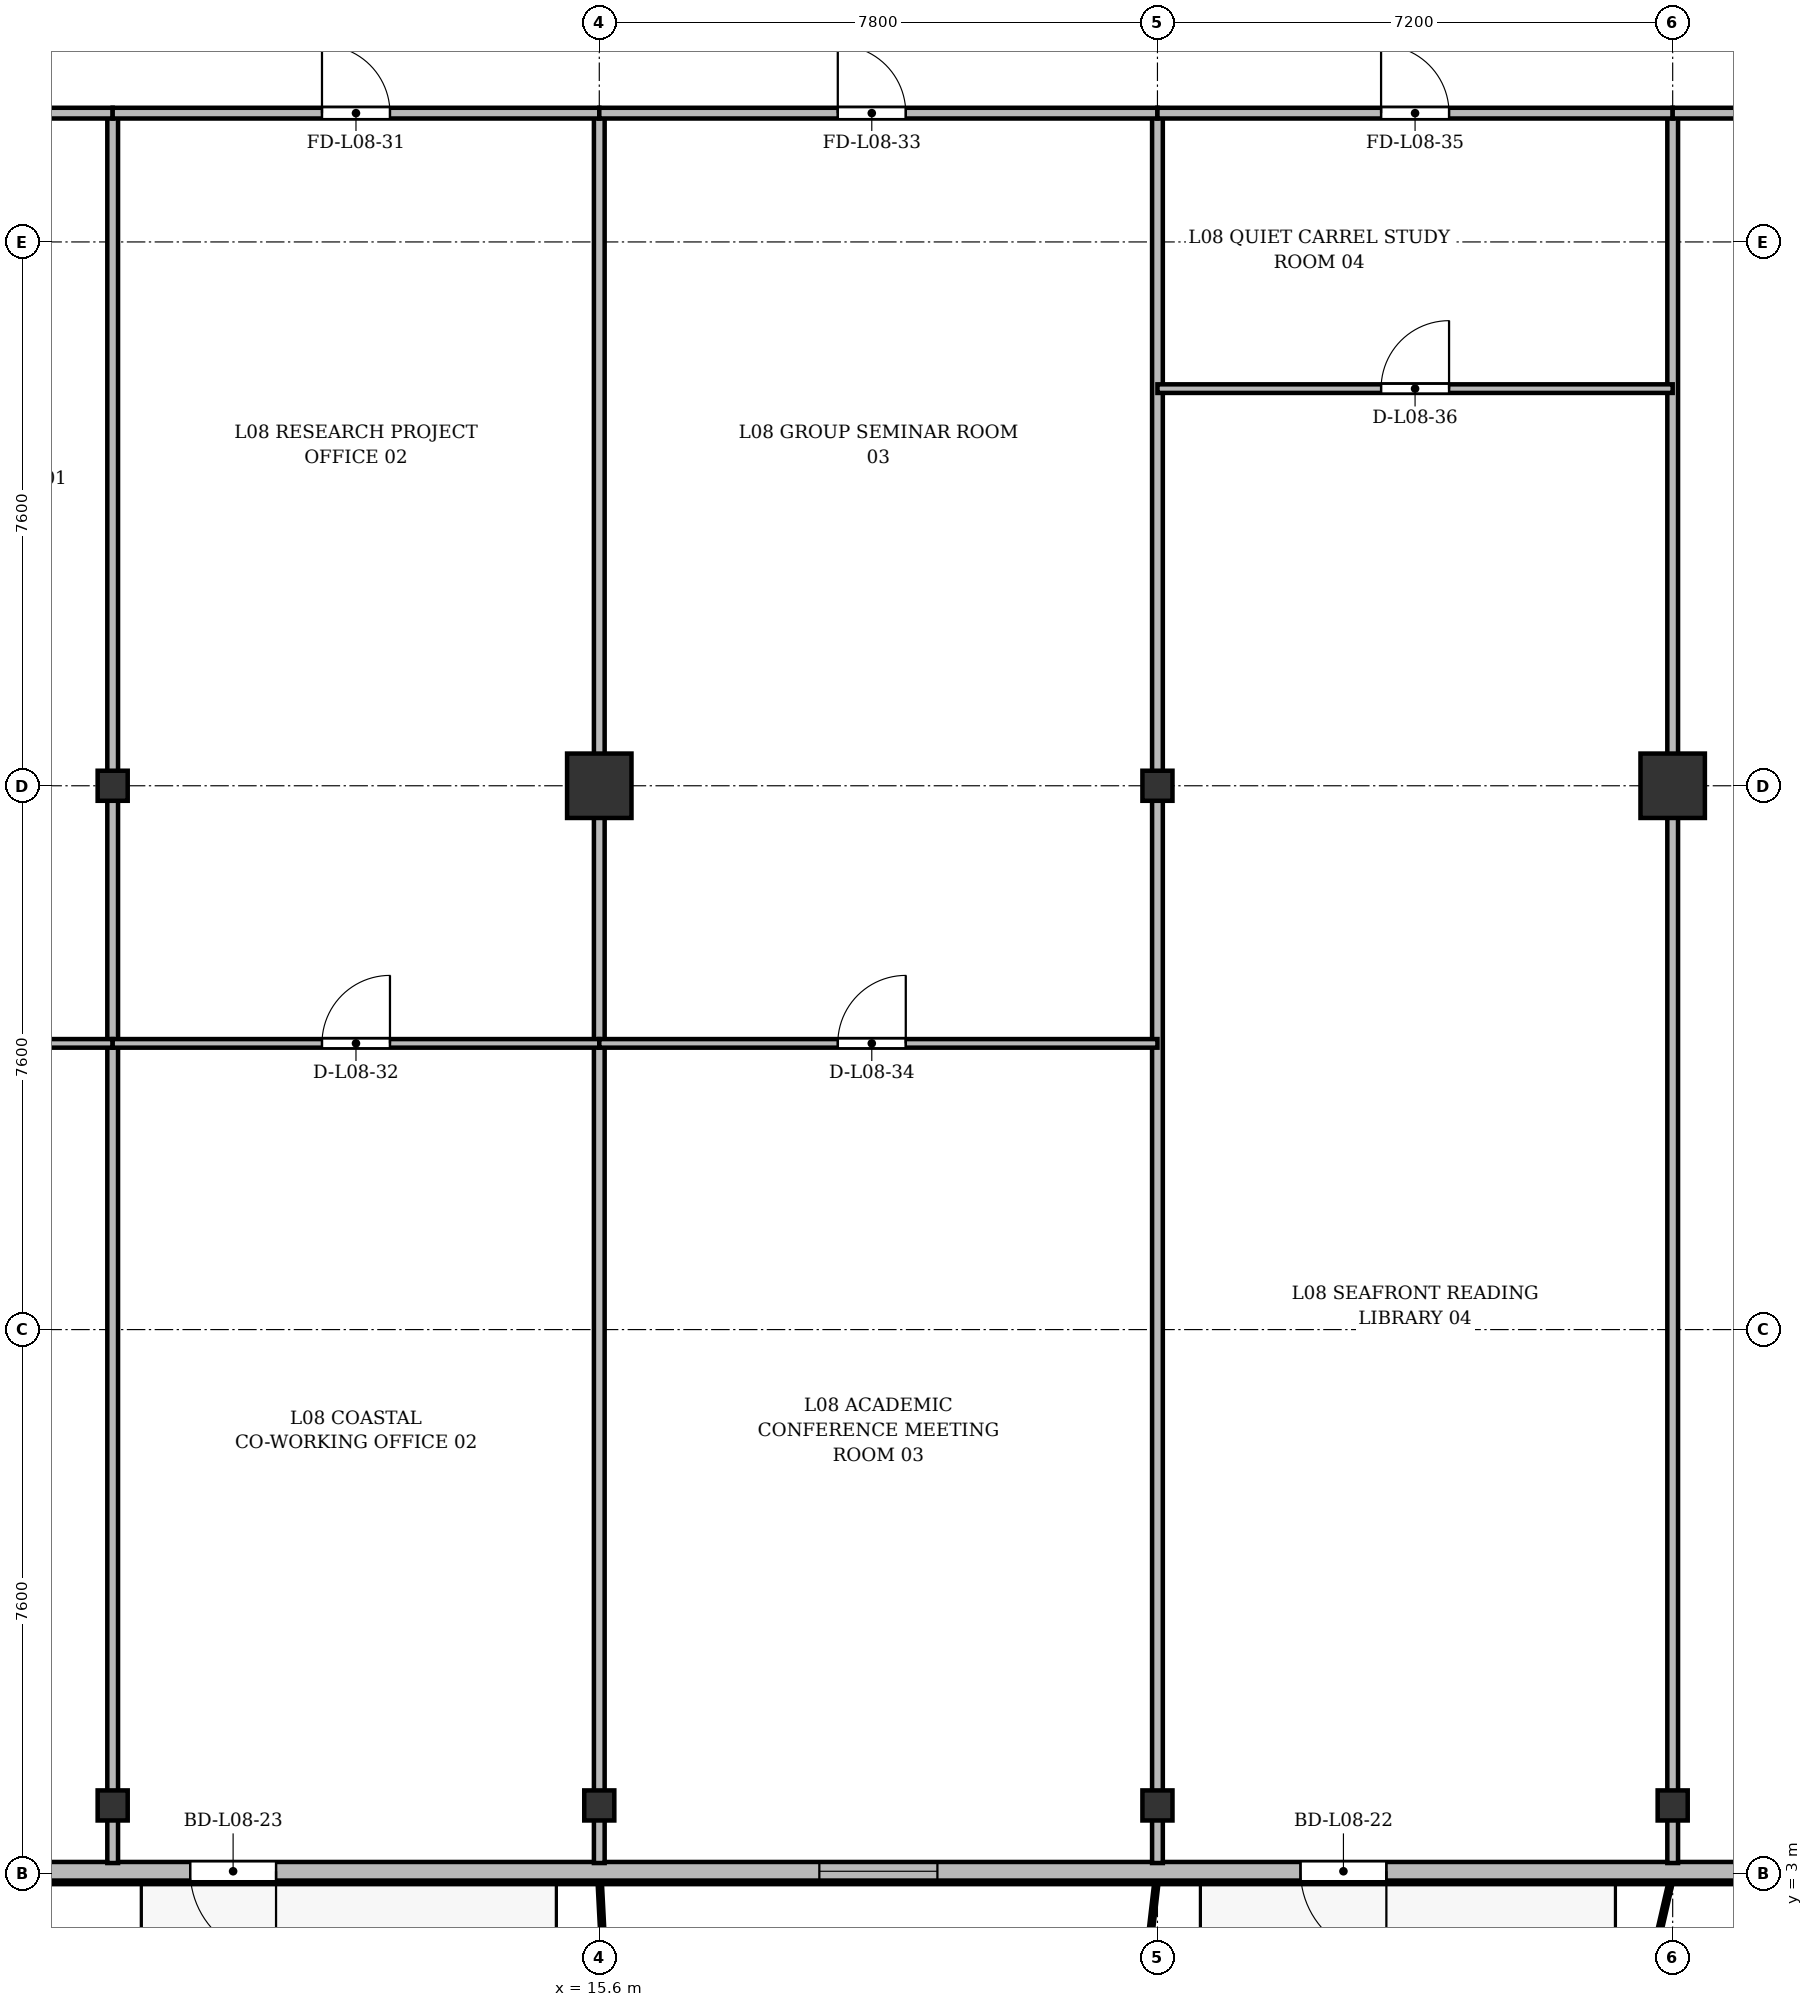
"""IFC4 building model, lengths in metres.
Left out: names, types, materials, properties, quantities, classifications, styles, units other than length and angle.
Written with IfcOpenShell. Run it as: python <this file> out.ifc"""

import sys

from ifc_helpers import new_model, si_unit, direction, frame, frame_2d, origin, origin_2d, place, context, subcontext, project, spatial, rectangle, i_section, extrude, source, transform, mapped, element, fill, save


model = new_model("IFC4")
c1 = context("Model", 3, precision=1e-05, world=origin(), true_north=direction((0.0, 1.0)))
c2 = subcontext(c1, "Body", "Model", "MODEL_VIEW")
j1 = project(units=[si_unit("LENGTHUNIT", "METRE"), si_unit("PLANEANGLEUNIT", "RADIAN")], contexts=[c1])
p1 = place(None, origin())
s1 = spatial("IfcSite", under=j1, at=p1, CompositionType="ELEMENT")
p2 = place(p1, origin())
s2 = spatial("IfcBuilding", under=s1, at=p2, CompositionType="ELEMENT")
p3 = place(p2, frame((0.0, 0.0, 34.3)))
s3 = spatial("IfcBuildingStorey", under=s2, at=p3, CompositionType="ELEMENT", Elevation=34.3)
m1 = source(origin(), c2, "Body", "SweptSolid", [
    extrude(i_section(OverallWidth=0.42, OverallDepth=0.42, WebThickness=0.026, FlangeThickness=0.04, at=origin_2d()), origin(), (0.0, 0.0, 1.0), 3.6),
])
for number, where, z_axis, x_axis in (
    (1, (8.8, 3.95, 0.0), (0.0, 0.0, 1.0), (1.0, 0.0, 0.0)),
    (2, (8.8, 18.2, 0.0), (0.0, 0.0, 1.0), (1.0, 0.0, 0.0)),
    (3, (15.6, 3.95, 0.0), (0.0, 0.0, 1.0), (1.0, 0.0, 0.0)),
):
    element("IfcColumn", number, at=place(p3, frame(where, z_axis=z_axis, x_axis=x_axis)), inside=s3, PredefinedType="COLUMN", context=c2, shape_type="MappedRepresentation", body=[
        mapped(m1, transform((0.0, 0.0, 0.0), x_axis=(1.0, 0.0, 0.0), y_axis=(0.0, 1.0, 0.0), z_axis=(0.0, 0.0, 1.0), scale=1.0)),
    ])
m2 = source(origin(), c2, "Body", "SweptSolid", [
    extrude(rectangle(XDim=0.9, YDim=0.9, at=origin_2d()), origin(), (0.0, 0.0, 1.0), 3.6),
])
p4 = place(p3, frame((15.6, 18.2, 0.0), z_axis=(0.0, 0.0, 1.0), x_axis=(1.0, 0.0, 0.0)))
e4 = element("IfcColumn", 4, at=p4, inside=s3, PredefinedType="COLUMN", context=c2, shape_type="MappedRepresentation", body=[
    mapped(m2, transform((0.0, 0.0, 0.0), x_axis=(1.0, 0.0, 0.0), y_axis=(0.0, 1.0, 0.0), z_axis=(0.0, 0.0, 1.0), scale=1.0)),
])
for number, where, z_axis, x_axis in (
    (5, (23.4, 3.95, 0.0), (0.0, 0.0, 1.0), (1.0, 0.0, 0.0)),
    (6, (23.4, 18.2, 0.0), (0.0, 0.0, 1.0), (1.0, 0.0, 0.0)),
    (7, (30.6, 3.95, 0.0), (0.0, 0.0, 1.0), (1.0, 0.0, 0.0)),
):
    element("IfcColumn", number, at=place(p3, frame(where, z_axis=z_axis, x_axis=x_axis)), inside=s3, PredefinedType="COLUMN", context=c2, shape_type="MappedRepresentation", body=[
        mapped(m1, transform((0.0, 0.0, 0.0), x_axis=(1.0, 0.0, 0.0), y_axis=(0.0, 1.0, 0.0), z_axis=(0.0, 0.0, 1.0), scale=1.0)),
    ])
p5 = place(p3, frame((30.6, 18.2, 0.0), z_axis=(0.0, 0.0, 1.0), x_axis=(1.0, 0.0, 0.0)))
e8 = element("IfcColumn", 8, at=p5, inside=s3, PredefinedType="COLUMN", context=c2, shape_type="MappedRepresentation", body=[
    mapped(m2, transform((0.0, 0.0, 0.0), x_axis=(1.0, 0.0, 0.0), y_axis=(0.0, 1.0, 0.0), z_axis=(0.0, 0.0, 1.0), scale=1.0)),
])
p6 = place(p3, frame((66.9, 3.03, 0.0), z_axis=(0.0, 0.0, 1.0), x_axis=(-1.0, 0.0, 0.0)))
e9 = element("IfcWall", 9, at=p6, inside=s3, PredefinedType="SOLIDWALL", context=c2, shape_type="SweptSolid", body=[
    extrude(rectangle(XDim=59.4, YDim=0.26, at=frame_2d((29.7, 0.0))), origin(), (0.0, 0.0, 1.0), 3.34),
])
p7 = place(p6, frame((3.875, 0.0, 0.9)))
e10 = element("IfcOpeningElement", 10, at=p7, cuts=e9, PredefinedType="OPENING", context=c2, shape_type="SweptSolid", body=[
    extrude(rectangle(XDim=1.65, YDim=1.85, at=frame_2d((0.825, 0.925))), frame((0.0, 0.14, 0.0), z_axis=(0.0, -1.0, 0.0), x_axis=(1.0, 0.0, 0.0)), (0.0, 0.0, 1.0), 0.28),
])
p8 = place(p6, frame((9.565, 0.0, 0.0)))
e11 = element("IfcOpeningElement", 11, at=p8, cuts=e9, PredefinedType="OPENING", context=c2, shape_type="SweptSolid", body=[
    extrude(rectangle(XDim=1.2, YDim=2.2, at=frame_2d((0.6, 1.1))), frame((0.0, 0.14, 0.0), z_axis=(0.0, -1.0, 0.0), x_axis=(1.0, 0.0, 0.0)), (0.0, 0.0, 1.0), 0.28),
])
p9 = place(p6, frame((18.4, 0.0, 0.9)))
e12 = element("IfcOpeningElement", 12, at=p9, cuts=e9, PredefinedType="OPENING", context=c2, shape_type="SweptSolid", body=[
    extrude(rectangle(XDim=2.2, YDim=1.8, at=frame_2d((1.1, 0.9))), frame((0.0, 0.14, 0.0), z_axis=(0.0, -1.0, 0.0), x_axis=(1.0, 0.0, 0.0)), (0.0, 0.0, 1.0), 0.28),
])
p10 = place(p6, frame((28.95, 0.0, 0.9)))
e13 = element("IfcOpeningElement", 13, at=p10, cuts=e9, PredefinedType="OPENING", context=c2, shape_type="SweptSolid", body=[
    extrude(rectangle(XDim=1.5, YDim=1.75, at=frame_2d((0.75, 0.875))), frame((0.0, 0.14, 0.0), z_axis=(0.0, -1.0, 0.0), x_axis=(1.0, 0.0, 0.0)), (0.0, 0.0, 1.0), 0.28),
])
p11 = place(p6, frame((40.301, 0.0, 0.0)))
e14 = element("IfcOpeningElement", 14, at=p11, cuts=e9, PredefinedType="OPENING", context=c2, shape_type="SweptSolid", body=[
    extrude(rectangle(XDim=1.2, YDim=2.2, at=frame_2d((0.6, 1.1))), frame((0.0, 0.14, 0.0), z_axis=(0.0, -1.0, 0.0), x_axis=(1.0, 0.0, 0.0)), (0.0, 0.0, 1.0), 0.28),
])
p12 = place(p6, frame((46.575, 0.0, 0.9)))
e15 = element("IfcOpeningElement", 15, at=p12, cuts=e9, PredefinedType="OPENING", context=c2, shape_type="SweptSolid", body=[
    extrude(rectangle(XDim=1.65, YDim=1.85, at=frame_2d((0.825, 0.925))), frame((0.0, 0.14, 0.0), z_axis=(0.0, -1.0, 0.0), x_axis=(1.0, 0.0, 0.0)), (0.0, 0.0, 1.0), 0.28),
])
p13 = place(p6, frame((55.817, 0.0, 0.0)))
e16 = element("IfcOpeningElement", 16, at=p13, cuts=e9, PredefinedType="OPENING", context=c2, shape_type="SweptSolid", body=[
    extrude(rectangle(XDim=1.2, YDim=2.2, at=frame_2d((0.6, 1.1))), frame((0.0, 0.14, 0.0), z_axis=(0.0, -1.0, 0.0), x_axis=(1.0, 0.0, 0.0)), (0.0, 0.0, 1.0), 0.28),
])
for number, where, z_axis, x_axis in (
    (17, (8.8, 3.145, 0.0), (0.0, 0.0, 1.0), (0.0, 1.0, 0.0)),
    (18, (15.6, 3.145, 0.0), (0.0, 0.0, 1.0), (0.0, 1.0, 0.0)),
    (19, (23.4, 3.145, 0.0), (0.0, 0.0, 1.0), (0.0, 1.0, 0.0)),
    (20, (30.6, 3.145, 0.0), (0.0, 0.0, 1.0), (0.0, 1.0, 0.0)),
):
    element("IfcWall", number, at=place(p3, frame(where, z_axis=z_axis, x_axis=x_axis)), inside=s3, PredefinedType="PARTITIONING", context=c2, shape_type="SweptSolid", body=[
        extrude(rectangle(XDim=24.455, YDim=0.15, at=frame_2d((12.228, 0.0))), origin(), (0.0, 0.0, 1.0), 2.752),
    ])
p14 = place(p3, frame((4.745, 27.6, 0.0), z_axis=(0.0, 0.0, 1.0), x_axis=(1.0, 0.0, 0.0)))
e21 = element("IfcWall", 21, at=p14, inside=s3, PredefinedType="PARTITIONING", context=c2, shape_type="SweptSolid", body=[
    extrude(rectangle(XDim=4.055, YDim=0.15, at=frame_2d((2.027, 0.0))), origin(), (0.0, 0.0, 1.0), 2.752),
])
p15 = place(p14, frame((1.462, 0.0, 0.0)))
e22 = element("IfcOpeningElement", 22, at=p15, cuts=e21, PredefinedType="OPENING", context=c2, shape_type="SweptSolid", body=[
    extrude(rectangle(XDim=0.95, YDim=2.15, at=frame_2d((0.475, 1.075))), frame((0.0, 0.085, 0.0), z_axis=(0.0, -1.0, 0.0), x_axis=(1.0, 0.0, 0.0)), (0.0, 0.0, 1.0), 0.17),
])
p16 = place(p3, frame((4.745, 14.6, 0.0), z_axis=(0.0, 0.0, 1.0), x_axis=(1.0, 0.0, 0.0)))
e23 = element("IfcWall", 23, at=p16, inside=s3, PredefinedType="PARTITIONING", context=c2, shape_type="SweptSolid", body=[
    extrude(rectangle(XDim=4.055, YDim=0.12, at=frame_2d((2.027, 0.0))), origin(), (0.0, 0.0, 1.0), 2.752),
])
p17 = place(p16, frame((1.462, 0.0, 0.0)))
e24 = element("IfcOpeningElement", 24, at=p17, cuts=e23, PredefinedType="OPENING", context=c2, shape_type="SweptSolid", body=[
    extrude(rectangle(XDim=0.95, YDim=2.15, at=frame_2d((0.475, 1.075))), frame((0.0, 0.07, 0.0), z_axis=(0.0, -1.0, 0.0), x_axis=(1.0, 0.0, 0.0)), (0.0, 0.0, 1.0), 0.14),
])
p18 = place(p3, frame((8.8, 27.6, 0.0), z_axis=(0.0, 0.0, 1.0), x_axis=(1.0, 0.0, 0.0)))
e25 = element("IfcWall", 25, at=p18, inside=s3, PredefinedType="PARTITIONING", context=c2, shape_type="SweptSolid", body=[
    extrude(rectangle(XDim=6.8, YDim=0.15, at=frame_2d((3.4, 0.0))), origin(), (0.0, 0.0, 1.0), 2.752),
])
p19 = place(p18, frame((2.925, 0.0, 0.0)))
e26 = element("IfcOpeningElement", 26, at=p19, cuts=e25, PredefinedType="OPENING", context=c2, shape_type="SweptSolid", body=[
    extrude(rectangle(XDim=0.95, YDim=2.15, at=frame_2d((0.475, 1.075))), frame((0.0, 0.085, 0.0), z_axis=(0.0, -1.0, 0.0), x_axis=(1.0, 0.0, 0.0)), (0.0, 0.0, 1.0), 0.17),
])
p20 = place(p3, frame((8.8, 14.6, 0.0), z_axis=(0.0, 0.0, 1.0), x_axis=(1.0, 0.0, 0.0)))
e27 = element("IfcWall", 27, at=p20, inside=s3, PredefinedType="PARTITIONING", context=c2, shape_type="SweptSolid", body=[
    extrude(rectangle(XDim=6.8, YDim=0.12, at=frame_2d((3.4, 0.0))), origin(), (0.0, 0.0, 1.0), 2.752),
])
p21 = place(p20, frame((2.925, 0.0, 0.0)))
e28 = element("IfcOpeningElement", 28, at=p21, cuts=e27, PredefinedType="OPENING", context=c2, shape_type="SweptSolid", body=[
    extrude(rectangle(XDim=0.95, YDim=2.15, at=frame_2d((0.475, 1.075))), frame((0.0, 0.07, 0.0), z_axis=(0.0, -1.0, 0.0), x_axis=(1.0, 0.0, 0.0)), (0.0, 0.0, 1.0), 0.14),
])
p22 = place(p3, frame((15.6, 27.6, 0.0), z_axis=(0.0, 0.0, 1.0), x_axis=(1.0, 0.0, 0.0)))
e29 = element("IfcWall", 29, at=p22, inside=s3, PredefinedType="PARTITIONING", context=c2, shape_type="SweptSolid", body=[
    extrude(rectangle(XDim=7.8, YDim=0.15, at=frame_2d((3.9, 0.0))), origin(), (0.0, 0.0, 1.0), 2.752),
])
p23 = place(p22, frame((3.333, 0.0, 0.0)))
e30 = element("IfcOpeningElement", 30, at=p23, cuts=e29, PredefinedType="OPENING", context=c2, shape_type="SweptSolid", body=[
    extrude(rectangle(XDim=0.95, YDim=2.15, at=frame_2d((0.475, 1.075))), frame((0.0, 0.085, 0.0), z_axis=(0.0, -1.0, 0.0), x_axis=(1.0, 0.0, 0.0)), (0.0, 0.0, 1.0), 0.17),
])
p24 = place(p3, frame((15.6, 14.6, 0.0), z_axis=(0.0, 0.0, 1.0), x_axis=(1.0, 0.0, 0.0)))
e31 = element("IfcWall", 31, at=p24, inside=s3, PredefinedType="PARTITIONING", context=c2, shape_type="SweptSolid", body=[
    extrude(rectangle(XDim=7.8, YDim=0.12, at=frame_2d((3.9, 0.0))), origin(), (0.0, 0.0, 1.0), 2.752),
])
p25 = place(p24, frame((3.333, 0.0, 0.0)))
e32 = element("IfcOpeningElement", 32, at=p25, cuts=e31, PredefinedType="OPENING", context=c2, shape_type="SweptSolid", body=[
    extrude(rectangle(XDim=0.95, YDim=2.15, at=frame_2d((0.475, 1.075))), frame((0.0, 0.07, 0.0), z_axis=(0.0, -1.0, 0.0), x_axis=(1.0, 0.0, 0.0)), (0.0, 0.0, 1.0), 0.14),
])
p26 = place(p3, frame((23.4, 27.6, 0.0), z_axis=(0.0, 0.0, 1.0), x_axis=(1.0, 0.0, 0.0)))
e33 = element("IfcWall", 33, at=p26, inside=s3, PredefinedType="PARTITIONING", context=c2, shape_type="SweptSolid", body=[
    extrude(rectangle(XDim=7.2, YDim=0.15, at=frame_2d((3.6, 0.0))), origin(), (0.0, 0.0, 1.0), 2.752),
])
p27 = place(p26, frame((3.125, 0.0, 0.0)))
e34 = element("IfcOpeningElement", 34, at=p27, cuts=e33, PredefinedType="OPENING", context=c2, shape_type="SweptSolid", body=[
    extrude(rectangle(XDim=0.95, YDim=2.15, at=frame_2d((0.475, 1.075))), frame((0.0, 0.085, 0.0), z_axis=(0.0, -1.0, 0.0), x_axis=(1.0, 0.0, 0.0)), (0.0, 0.0, 1.0), 0.17),
])
p28 = place(p3, frame((23.4, 23.75, 0.0), z_axis=(0.0, 0.0, 1.0), x_axis=(1.0, 0.0, 0.0)))
e35 = element("IfcWall", 35, at=p28, inside=s3, PredefinedType="PARTITIONING", context=c2, shape_type="SweptSolid", body=[
    extrude(rectangle(XDim=7.2, YDim=0.12, at=frame_2d((3.6, 0.0))), origin(), (0.0, 0.0, 1.0), 2.752),
])
p29 = place(p28, frame((3.125, 0.0, 0.0)))
e36 = element("IfcOpeningElement", 36, at=p29, cuts=e35, PredefinedType="OPENING", context=c2, shape_type="SweptSolid", body=[
    extrude(rectangle(XDim=0.95, YDim=2.15, at=frame_2d((0.475, 1.075))), frame((0.0, 0.07, 0.0), z_axis=(0.0, -1.0, 0.0), x_axis=(1.0, 0.0, 0.0)), (0.0, 0.0, 1.0), 0.14),
])
p30 = place(p3, frame((30.6, 27.6, 0.0), z_axis=(0.0, 0.0, 1.0), x_axis=(1.0, 0.0, 0.0)))
e37 = element("IfcWall", 37, at=p30, inside=s3, PredefinedType="PARTITIONING", context=c2, shape_type="SweptSolid", body=[
    extrude(rectangle(XDim=13.2, YDim=0.15, at=frame_2d((6.6, 0.0))), origin(), (0.0, 0.0, 1.0), 2.752),
])
p31 = place(p30, frame((5.8, 0.0, 0.0)))
e38 = element("IfcOpeningElement", 38, at=p31, cuts=e37, PredefinedType="OPENING", context=c2, shape_type="SweptSolid", body=[
    extrude(rectangle(XDim=1.6, YDim=2.2, at=frame_2d((0.8, 1.1))), frame((0.0, 0.085, 0.0), z_axis=(0.0, -1.0, 0.0), x_axis=(1.0, 0.0, 0.0)), (0.0, 0.0, 1.0), 0.17),
])
m3 = source(origin(), c2, "Body", "SweptSolid", [
    extrude(rectangle(XDim=1.2, YDim=2.2, at=frame_2d((0.6, 1.1))), frame((0.0, 0.025, 0.0), z_axis=(0.0, -1.0, 0.0), x_axis=(1.0, 0.0, 0.0)), (0.0, 0.0, 1.0), 0.05),
])
p32 = place(p11, origin())
e39 = element("IfcDoor", 39, at=p32, inside=s3, OperationType="SINGLE_SWING_LEFT", PredefinedType="DOOR", context=c2, shape_type="MappedRepresentation", body=[
    mapped(m3, transform((0.0, 0.0, 0.0), x_axis=(1.0, 0.0, 0.0), y_axis=(0.0, 1.0, 0.0), z_axis=(0.0, 0.0, 1.0), scale=1.0)),
])
fill(e14, e39)
m4 = source(origin(), c2, "Body", "SweptSolid", [
    extrude(rectangle(XDim=1.65, YDim=1.85, at=frame_2d((0.825, 0.925))), frame((0.0, 0.03, 0.0), z_axis=(0.0, -1.0, 0.0), x_axis=(1.0, 0.0, 0.0)), (0.0, 0.0, 1.0), 0.06),
])
p33 = place(p12, origin())
e40 = element("IfcWindow", 40, at=p33, inside=s3, PartitioningType="SINGLE_PANEL", PredefinedType="WINDOW", context=c2, shape_type="MappedRepresentation", body=[
    mapped(m4, transform((0.0, 0.0, 0.0), x_axis=(1.0, 0.0, 0.0), y_axis=(0.0, 1.0, 0.0), z_axis=(0.0, 0.0, 1.0), scale=1.0)),
])
fill(e15, e40)
p34 = place(p13, origin())
e41 = element("IfcDoor", 41, at=p34, inside=s3, OperationType="SINGLE_SWING_LEFT", PredefinedType="DOOR", context=c2, shape_type="MappedRepresentation", body=[
    mapped(m3, transform((0.0, 0.0, 0.0), x_axis=(1.0, 0.0, 0.0), y_axis=(0.0, 1.0, 0.0), z_axis=(0.0, 0.0, 1.0), scale=1.0)),
])
fill(e16, e41)
m5 = source(origin(), c2, "Body", "SweptSolid", [
    extrude(rectangle(XDim=0.95, YDim=2.15, at=frame_2d((0.475, 1.075))), frame((0.0, 0.025, 0.0), z_axis=(0.0, -1.0, 0.0), x_axis=(1.0, 0.0, 0.0)), (0.0, 0.0, 1.0), 0.05),
])
p35 = place(p19, origin())
e42 = element("IfcDoor", 42, at=p35, inside=s3, OperationType="SINGLE_SWING_LEFT", PredefinedType="DOOR", context=c2, shape_type="MappedRepresentation", body=[
    mapped(m5, transform((0.0, 0.0, 0.0), x_axis=(1.0, 0.0, 0.0), y_axis=(0.0, 1.0, 0.0), z_axis=(0.0, 0.0, 1.0), scale=1.0)),
])
fill(e26, e42)
p36 = place(p21, origin())
e43 = element("IfcDoor", 43, at=p36, inside=s3, OperationType="SINGLE_SWING_RIGHT", PredefinedType="DOOR", context=c2, shape_type="MappedRepresentation", body=[
    mapped(m5, transform((0.0, 0.0, 0.0), x_axis=(1.0, 0.0, 0.0), y_axis=(0.0, 1.0, 0.0), z_axis=(0.0, 0.0, 1.0), scale=1.0)),
])
fill(e28, e43)
p37 = place(p23, origin())
e44 = element("IfcDoor", 44, at=p37, inside=s3, OperationType="SINGLE_SWING_LEFT", PredefinedType="DOOR", context=c2, shape_type="MappedRepresentation", body=[
    mapped(m5, transform((0.0, 0.0, 0.0), x_axis=(1.0, 0.0, 0.0), y_axis=(0.0, 1.0, 0.0), z_axis=(0.0, 0.0, 1.0), scale=1.0)),
])
fill(e30, e44)
p38 = place(p25, origin())
e45 = element("IfcDoor", 45, at=p38, inside=s3, OperationType="SINGLE_SWING_RIGHT", PredefinedType="DOOR", context=c2, shape_type="MappedRepresentation", body=[
    mapped(m5, transform((0.0, 0.0, 0.0), x_axis=(1.0, 0.0, 0.0), y_axis=(0.0, 1.0, 0.0), z_axis=(0.0, 0.0, 1.0), scale=1.0)),
])
fill(e32, e45)
p39 = place(p27, origin())
e46 = element("IfcDoor", 46, at=p39, inside=s3, OperationType="SINGLE_SWING_LEFT", PredefinedType="DOOR", context=c2, shape_type="MappedRepresentation", body=[
    mapped(m5, transform((0.0, 0.0, 0.0), x_axis=(1.0, 0.0, 0.0), y_axis=(0.0, 1.0, 0.0), z_axis=(0.0, 0.0, 1.0), scale=1.0)),
])
fill(e34, e46)
p40 = place(p29, origin())
e47 = element("IfcDoor", 47, at=p40, inside=s3, OperationType="SINGLE_SWING_RIGHT", PredefinedType="DOOR", context=c2, shape_type="MappedRepresentation", body=[
    mapped(m5, transform((0.0, 0.0, 0.0), x_axis=(1.0, 0.0, 0.0), y_axis=(0.0, 1.0, 0.0), z_axis=(0.0, 0.0, 1.0), scale=1.0)),
])
fill(e36, e47)
save(model, sys.argv[1])
